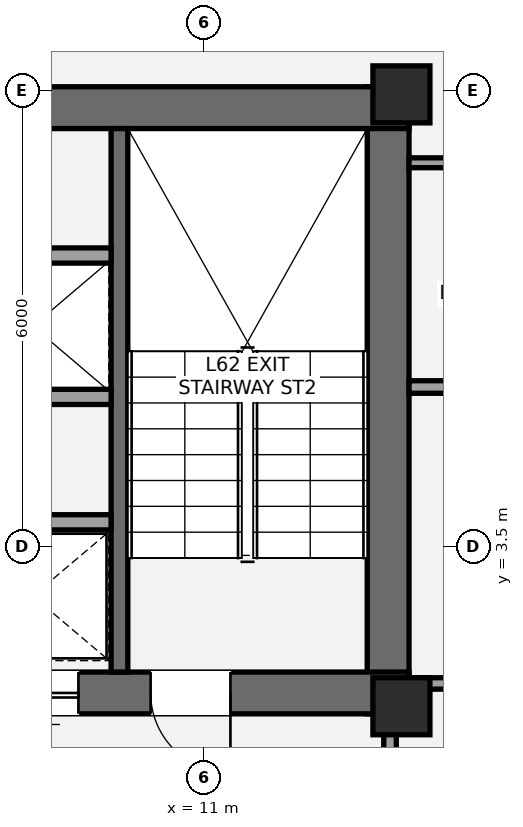
"""IFC4 building model, lengths in metres.
Left out: names, types, materials, properties, quantities, classifications, styles, units other than length and angle.
Written with IfcOpenShell. Run it as: python <this file> out.ifc"""

import sys

from ifc_helpers import new_model, si_unit, direction, frame, frame_2d, origin, origin_2d, place, context, subcontext, project, spatial, rectangle, extrude, element, fill, save


model = new_model("IFC4")
c1 = context("Model", 3, precision=1e-05, world=origin(), true_north=direction((0.0, 1.0)))
c2 = subcontext(c1, "Body", "Model", "MODEL_VIEW")
j1 = project(units=[si_unit("LENGTHUNIT", "METRE"), si_unit("PLANEANGLEUNIT", "RADIAN")], contexts=[c1])
p1 = place(None, origin())
s1 = spatial("IfcSite", under=j1, at=p1, CompositionType="ELEMENT")
p2 = place(p1, origin())
s2 = spatial("IfcBuilding", under=s1, at=p2, CompositionType="ELEMENT")
p3 = place(p2, frame((0.0, 0.0, 222.6)))
s3 = spatial("IfcBuildingStorey", under=s2, at=p3, CompositionType="ELEMENT", Elevation=222.6)
p4 = place(p3, frame((13.425, 1.3, 0.0), z_axis=(0.0, 0.0, 1.0), x_axis=(0.0, 1.0, 0.0)))
e1 = element("IfcWall", 1, at=p4, inside=s3, PredefinedType="SHEAR", context=c2, shape_type="SweptSolid", body=[
    extrude(rectangle(XDim=8.25, YDim=0.55, at=frame_2d((4.125, 0.0))), origin(), (0.0, 0.0, 1.0), 3.15),
])
p5 = place(p3, frame((4.525, 9.275, 0.0), z_axis=(0.0, 0.0, 1.0), x_axis=(1.0, 0.0, 0.0)))
e2 = element("IfcWall", 2, at=p5, inside=s3, PredefinedType="SHEAR", context=c2, shape_type="SweptSolid", body=[
    extrude(rectangle(XDim=9.175, YDim=0.55, at=frame_2d((4.587, 0.0))), origin(), (0.0, 0.0, 1.0), 3.15),
])
p6 = place(p3, frame((13.7, 1.575, 0.0), z_axis=(0.0, 0.0, 1.0), x_axis=(-1.0, 0.0, 0.0)))
e3 = element("IfcWall", 3, at=p6, inside=s3, PredefinedType="SHEAR", context=c2, shape_type="SweptSolid", body=[
    extrude(rectangle(XDim=8.775, YDim=0.55, at=frame_2d((4.387, 0.0))), origin(), (0.0, 0.0, 1.0), 3.15),
])
p7 = place(p6, frame((2.35, 0.0, 0.0)))
e4 = element("IfcOpeningElement", 4, at=p7, cuts=e3, PredefinedType="OPENING", context=c2, shape_type="SweptSolid", body=[
    extrude(rectangle(XDim=1.05, YDim=2.15, at=frame_2d((0.525, 1.075))), frame((0.0, 0.285, 0.0), z_axis=(0.0, -1.0, 0.0), x_axis=(1.0, 0.0, 0.0)), (0.0, 0.0, 1.0), 0.57),
])
p8 = place(p6, frame((4.35, 0.0, 0.0)))
e5 = element("IfcOpeningElement", 5, at=p8, cuts=e3, PredefinedType="OPENING", context=c2, shape_type="SweptSolid", body=[
    extrude(rectangle(XDim=1.1, YDim=2.2, at=frame_2d((0.55, 1.1))), frame((0.0, 0.285, 0.0), z_axis=(0.0, -1.0, 0.0), x_axis=(1.0, 0.0, 0.0)), (0.0, 0.0, 1.0), 0.57),
])
p9 = place(p3, frame((9.89, 1.85, 0.0), z_axis=(0.0, 0.0, 1.0), x_axis=(0.0, 1.0, 0.0)))
e6 = element("IfcWall", 6, at=p9, inside=s3, PredefinedType="SHEAR", context=c2, shape_type="SweptSolid", body=[
    extrude(rectangle(XDim=7.15, YDim=0.22, at=frame_2d((3.575, 0.0))), origin(), (0.0, 0.0, 1.0), 3.15),
])
for number, where, z_axis, x_axis in (
    (7, (13.6, 1.4, 0.0), (0.0, 0.0, 1.0), (1.0, 0.0, 0.0)),
    (8, (13.6, 9.45, 0.0), (0.0, 0.0, 1.0), (1.0, 0.0, 0.0)),
):
    element("IfcColumn", number, at=place(p3, frame(where, z_axis=z_axis, x_axis=x_axis)), inside=s3, PredefinedType="PILASTER", context=c2, shape_type="SweptSolid", body=[
        extrude(rectangle(XDim=0.75, YDim=0.75, at=origin_2d()), origin(), (0.0, 0.0, 1.0), 3.15),
    ])
p10 = place(p3, frame((14.033, 11.516, 0.0), z_axis=(0.0, 0.0, 1.0), x_axis=(0.827642668093, -0.561255391023, 0.0)))
e9 = element("IfcWall", 9, at=p10, inside=s3, PredefinedType="STANDARD", context=c2, shape_type="SweptSolid", body=[
    extrude(rectangle(XDim=3.738, YDim=0.44, at=frame_2d((1.869, 0.0))), origin(), (0.0, 0.0, 1.0), 2.336),
])
p11 = place(p10, frame((0.498, 0.0, 0.55)))
e10 = element("IfcOpeningElement", 10, at=p11, cuts=e9, PredefinedType="OPENING", context=c2, shape_type="SweptSolid", body=[
    extrude(rectangle(XDim=1.75, YDim=1.55, at=frame_2d((0.875, 0.775))), frame((0.0, 0.23, 0.0), z_axis=(0.0, -1.0, 0.0), x_axis=(1.0, 0.0, 0.0)), (0.0, 0.0, 1.0), 0.46),
])
p12 = place(p3, frame((13.45, -2.15, 0.0), z_axis=(0.0, 0.0, 1.0), x_axis=(0.0, 1.0, 0.0)))
e11 = element("IfcWall", 11, at=p12, inside=s3, PredefinedType="PARTITIONING", context=c2, shape_type="SweptSolid", body=[
    extrude(rectangle(XDim=3.5, YDim=0.165, at=frame_2d((1.75, 0.0))), origin(), (0.0, 0.0, 1.0), 2.423),
])
p13 = place(p12, frame((0.67, 0.0, 0.0)))
e12 = element("IfcOpeningElement", 12, at=p13, cuts=e11, PredefinedType="OPENING", context=c2, shape_type="SweptSolid", body=[
    extrude(rectangle(XDim=1.05, YDim=2.15, at=frame_2d((0.525, 1.075))), frame((0.0, 0.093, 0.0), z_axis=(0.0, -1.0, 0.0), x_axis=(1.0, 0.0, 0.0)), (0.0, 0.0, 1.0), 0.185),
])
p14 = place(p3, frame((5.475, 3.82, 0.0), z_axis=(0.0, 0.0, 1.0), x_axis=(1.0, 0.0, 0.0)))
e13 = element("IfcWall", 13, at=p14, inside=s3, PredefinedType="SOLIDWALL", context=c2, shape_type="SweptSolid", body=[
    extrude(rectangle(XDim=4.305, YDim=0.2, at=frame_2d((2.152, 0.0))), origin(), (0.0, 0.0, 1.0), 2.97),
])
p15 = place(p14, frame((0.65, 0.0, 0.0)))
e14 = element("IfcOpeningElement", 14, at=p15, cuts=e13, PredefinedType="OPENING", context=c2, shape_type="SweptSolid", body=[
    extrude(rectangle(XDim=1.2, YDim=2.2, at=frame_2d((0.6, 1.1))), frame((0.0, 0.11, 0.0), z_axis=(0.0, -1.0, 0.0), x_axis=(1.0, 0.0, 0.0)), (0.0, 0.0, 1.0), 0.22),
])
for number, where, z_axis, x_axis in (
    (15, (5.475, 5.47, 0.0), (0.0, 0.0, 1.0), (1.0, 0.0, 0.0)),
    (16, (5.475, 7.33, 0.0), (0.0, 0.0, 1.0), (1.0, 0.0, 0.0)),
):
    element("IfcWall", number, at=place(p3, frame(where, z_axis=z_axis, x_axis=x_axis)), inside=s3, PredefinedType="SOLIDWALL", context=c2, shape_type="SweptSolid", body=[
        extrude(rectangle(XDim=4.305, YDim=0.2, at=frame_2d((2.152, 0.0))), origin(), (0.0, 0.0, 1.0), 2.97),
    ])
p16 = place(p3, frame((13.7, 5.6, 0.0), z_axis=(0.0, 0.0, 1.0), x_axis=(1.0, 0.0, 0.0)))
e17 = element("IfcWall", 17, at=p16, inside=s3, PredefinedType="PARTITIONING", context=c2, shape_type="SweptSolid", body=[
    extrude(rectangle(XDim=6.785, YDim=0.165, at=frame_2d((3.393, 0.0))), origin(), (0.0, 0.0, 1.0), 2.423),
])
p17 = place(p16, frame((3.405, 0.0, 0.0)))
e18 = element("IfcOpeningElement", 18, at=p17, cuts=e17, PredefinedType="OPENING", context=c2, shape_type="SweptSolid", body=[
    extrude(rectangle(XDim=0.85, YDim=2.1, at=frame_2d((0.425, 1.05))), frame((0.0, 0.093, 0.0), z_axis=(0.0, -1.0, 0.0), x_axis=(1.0, 0.0, 0.0)), (0.0, 0.0, 1.0), 0.185),
])
p18 = place(p3, frame((13.7, 1.7, 0.0), z_axis=(0.0, 0.0, 1.0), x_axis=(1.0, 0.0, 0.0)))
e19 = element("IfcWall", 19, at=p18, inside=s3, PredefinedType="PLUMBINGWALL", context=c2, shape_type="SweptSolid", body=[
    extrude(rectangle(XDim=4.25, YDim=0.15, at=frame_2d((2.125, 0.0))), origin(), (0.0, 0.0, 1.0), 2.423),
])
p19 = place(p18, frame((0.55, 0.0, 0.0)))
e20 = element("IfcOpeningElement", 20, at=p19, cuts=e19, PredefinedType="OPENING", context=c2, shape_type="SweptSolid", body=[
    extrude(rectangle(XDim=0.8, YDim=2.1, at=frame_2d((0.4, 1.05))), frame((0.0, 0.085, 0.0), z_axis=(0.0, -1.0, 0.0), x_axis=(1.0, 0.0, 0.0)), (0.0, 0.0, 1.0), 0.17),
])
p20 = place(p18, frame((2.15, 0.0, 0.0)))
e21 = element("IfcOpeningElement", 21, at=p20, cuts=e19, PredefinedType="OPENING", context=c2, shape_type="SweptSolid", body=[
    extrude(rectangle(XDim=0.85, YDim=2.1, at=frame_2d((0.425, 1.05))), frame((0.0, 0.085, 0.0), z_axis=(0.0, -1.0, 0.0), x_axis=(1.0, 0.0, 0.0)), (0.0, 0.0, 1.0), 0.17),
])
p21 = place(p3, frame((13.7, 8.55, 0.0), z_axis=(0.0, 0.0, 1.0), x_axis=(1.0, 0.0, 0.0)))
e22 = element("IfcWall", 22, at=p21, inside=s3, PredefinedType="PARTITIONING", context=c2, shape_type="SweptSolid", body=[
    extrude(rectangle(XDim=4.037, YDim=0.13, at=frame_2d((2.019, 0.0))), origin(), (0.0, 0.0, 1.0), 2.423),
])
p22 = place(p21, frame((1.879, 0.0, 0.0)))
e23 = element("IfcOpeningElement", 23, at=p22, cuts=e22, PredefinedType="OPENING", context=c2, shape_type="SweptSolid", body=[
    extrude(rectangle(XDim=0.85, YDim=2.1, at=frame_2d((0.425, 1.05))), frame((0.0, 0.075, 0.0), z_axis=(0.0, -1.0, 0.0), x_axis=(1.0, 0.0, 0.0)), (0.0, 0.0, 1.0), 0.15),
])
p23 = place(p7, origin())
e24 = element("IfcDoor", 24, at=p23, inside=s3, OperationType="SINGLE_SWING_LEFT", PredefinedType="DOOR", context=c2, shape_type="SweptSolid", body=[
    extrude(rectangle(XDim=1.05, YDim=2.15, at=frame_2d((0.525, 1.075))), frame((0.0, 0.025, 0.0), z_axis=(0.0, -1.0, 0.0), x_axis=(1.0, 0.0, 0.0)), (0.0, 0.0, 1.0), 0.05),
])
fill(e4, e24)
p24 = place(p8, origin())
e25 = element("IfcDoor", 25, at=p24, inside=s3, OperationType="SLIDING_TO_LEFT", PredefinedType="DOOR", context=c2, shape_type="SweptSolid", body=[
    extrude(rectangle(XDim=1.1, YDim=2.2, at=frame_2d((0.55, 1.1))), frame((0.0, 0.025, 0.0), z_axis=(0.0, -1.0, 0.0), x_axis=(1.0, 0.0, 0.0)), (0.0, 0.0, 1.0), 0.05),
])
fill(e5, e25)
save(model, sys.argv[1])
